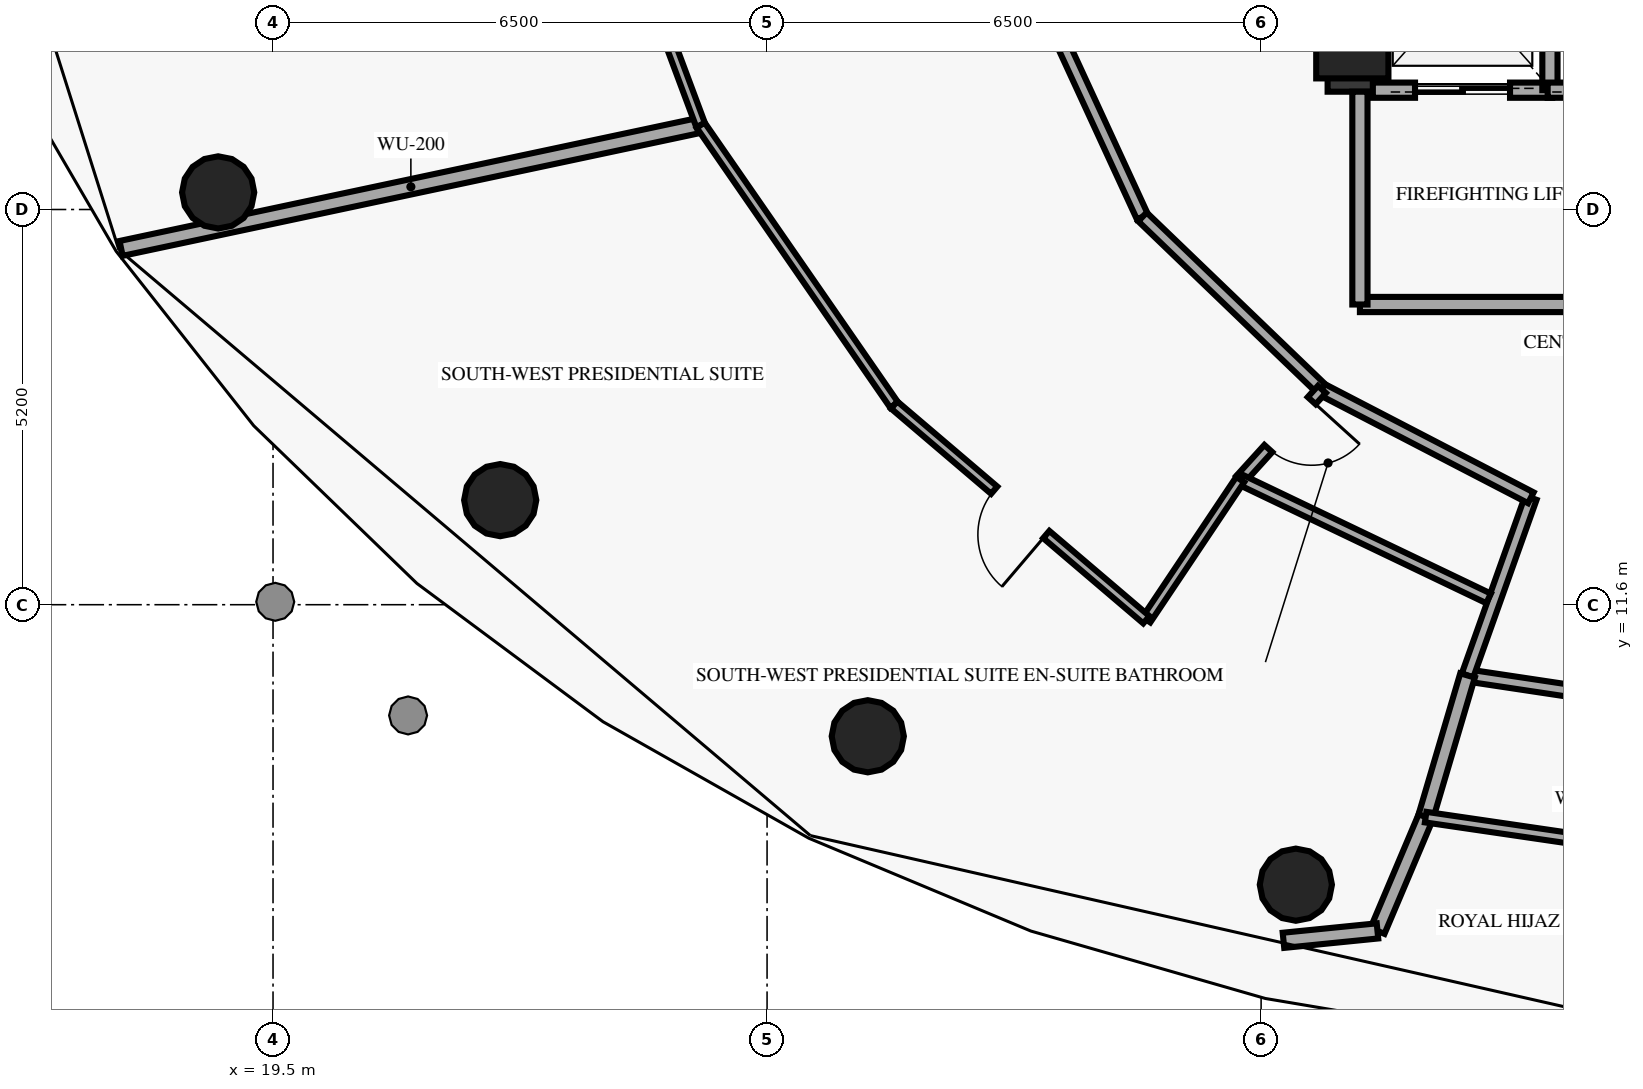
"""IFC4 building model, lengths in metres.
Left out: names, types, materials, properties, quantities, classifications, styles, units other than length and angle.
Written with IfcOpenShell. Run it as: python <this file> out.ifc"""

import sys

from ifc_helpers import new_model, si_unit, direction, frame, frame_2d, origin, origin_2d, place, context, subcontext, project, spatial, rectangle, circle, extrude, element, fill, save


model = new_model("IFC4")
c1 = context("Model", 3, precision=1e-05, world=origin(), true_north=direction((0.0, 1.0)))
c2 = subcontext(c1, "Body", "Model", "MODEL_VIEW")
j1 = project(units=[si_unit("LENGTHUNIT", "METRE"), si_unit("PLANEANGLEUNIT", "RADIAN")], contexts=[c1])
p1 = place(None, origin())
s1 = spatial("IfcSite", under=j1, at=p1, CompositionType="ELEMENT")
p2 = place(p1, origin())
s2 = spatial("IfcBuilding", under=s1, at=p2, CompositionType="ELEMENT")
p3 = place(p2, frame((0.0, 0.0, 192.25)))
s3 = spatial("IfcBuildingStorey", under=s2, at=p3, CompositionType="ELEMENT", Elevation=192.25)
p4 = place(p3, frame((33.7, 19.0, 0.0), z_axis=(0.0, 0.0, 1.0), x_axis=(1.0, 0.0, 0.0)))
e1 = element("IfcColumn", 1, at=p4, inside=s3, PredefinedType="PILASTER", context=c2, shape_type="SweptSolid", body=[
    extrude(rectangle(XDim=0.95, YDim=0.95, at=origin_2d()), origin(), (0.0, 0.0, 1.0), 3.35),
])
for number, where, z_axis, x_axis in (
    (2, (18.778, 17.025, 0.0), (0.0, 0.0, 1.0), (1.0, 0.0, 0.0)),
    (3, (22.489, 12.976, 0.0), (0.0, 0.0, 1.0), (1.0, 0.0, 0.0)),
    (4, (27.325, 9.869, 0.0), (0.0, 0.0, 1.0), (1.0, 0.0, 0.0)),
    (5, (32.957, 7.916, 0.0), (0.0, 0.0, 1.0), (1.0, 0.0, 0.0)),
):
    element("IfcColumn", number, at=place(p3, frame(where, z_axis=z_axis, x_axis=x_axis)), inside=s3, PredefinedType="COLUMN", context=c2, shape_type="SweptSolid", body=[
        extrude(circle(Radius=0.475, at=origin_2d()), origin(), (0.0, 0.0, 1.0), 3.35),
    ])
p5 = place(p3, frame((33.7, 18.35, 0.0), z_axis=(0.0, 0.0, 1.0), x_axis=(0.0, 1.0, 0.0)))
e6 = element("IfcWall", 6, at=p5, inside=s3, PredefinedType="SHEAR", context=c2, shape_type="SweptSolid", body=[
    extrude(rectangle(XDim=2.95, YDim=0.65, at=frame_2d((1.475, 0.0))), origin(), (0.0, 0.0, 1.0), 3.35),
])
p6 = place(p3, frame((33.97, 18.37, 0.0), z_axis=(0.0, 0.0, 1.0), x_axis=(1.0, 0.0, 0.0)))
e7 = element("IfcWall", 7, at=p6, inside=s3, PredefinedType="SOLIDWALL", context=c2, shape_type="SweptSolid", body=[
    extrude(rectangle(XDim=2.36, YDim=0.2, at=frame_2d((1.18, 0.0))), origin(), (0.0, 0.0, 1.0), 3.35),
])
p7 = place(p6, frame((0.555, 0.0, 0.0)))
e8 = element("IfcOpeningElement", 8, at=p7, cuts=e7, PredefinedType="OPENING", context=c2, shape_type="SweptSolid", body=[
    extrude(rectangle(XDim=1.25, YDim=2.2, at=frame_2d((0.625, 1.1))), frame((0.0, 0.11, 0.0), z_axis=(0.0, -1.0, 0.0), x_axis=(1.0, 0.0, 0.0)), (0.0, 0.0, 1.0), 0.22),
])
p8 = place(p3, frame((36.3, 18.37, 0.0), z_axis=(0.0, 0.0, 1.0), x_axis=(0.0, 1.0, 0.0)))
e9 = element("IfcWall", 9, at=p8, inside=s3, PredefinedType="SOLIDWALL", context=c2, shape_type="SweptSolid", body=[
    extrude(rectangle(XDim=2.71, YDim=0.2, at=frame_2d((1.355, 0.0))), origin(), (0.0, 0.0, 1.0), 3.35),
])
p9 = place(p3, frame((36.27, 18.37, 0.0), z_axis=(0.0, 0.0, 1.0), x_axis=(1.0, 0.0, 0.0)))
e10 = element("IfcWall", 10, at=p9, inside=s3, PredefinedType="SOLIDWALL", context=c2, shape_type="SweptSolid", body=[
    extrude(rectangle(XDim=2.36, YDim=0.2, at=frame_2d((1.18, 0.0))), origin(), (0.0, 0.0, 1.0), 3.35),
])
p10 = place(p9, frame((0.38, 0.0, 0.0)))
e11 = element("IfcOpeningElement", 11, at=p10, cuts=e10, PredefinedType="OPENING", context=c2, shape_type="SweptSolid", body=[
    extrude(rectangle(XDim=1.25, YDim=2.2, at=frame_2d((0.625, 1.1))), frame((0.0, 0.11, 0.0), z_axis=(0.0, -1.0, 0.0), x_axis=(1.0, 0.0, 0.0)), (0.0, 0.0, 1.0), 0.22),
])
p11 = place(p3, frame((33.8, 15.55, 0.0), z_axis=(0.0, 0.0, 1.0), x_axis=(1.0, 0.0, 0.0)))
e12 = element("IfcWall", 12, at=p11, inside=s3, PredefinedType="SOLIDWALL", context=c2, shape_type="SweptSolid", body=[
    extrude(rectangle(XDim=7.55, YDim=0.2, at=frame_2d((3.775, 0.0))), origin(), (0.0, 0.0, 1.0), 3.35),
])
p12 = place(p3, frame((33.8, 15.55, 0.0), z_axis=(0.0, 0.0, 1.0), x_axis=(0.0, 1.0, 0.0)))
e13 = element("IfcWall", 13, at=p12, inside=s3, PredefinedType="SOLIDWALL", context=c2, shape_type="SweptSolid", body=[
    extrude(rectangle(XDim=2.8, YDim=0.2, at=frame_2d((1.4, 0.0))), origin(), (0.0, 0.0, 1.0), 3.35),
])
p13 = place(p3, frame((35.216, 10.669, 0.0), z_axis=(0.0, 0.0, 1.0), x_axis=(0.988888097148, -0.148661801817, 0.0)))
e14 = element("IfcWall", 14, at=p13, inside=s3, PredefinedType="PARTITIONING", context=c2, shape_type="SweptSolid", body=[
    extrude(rectangle(XDim=3.826, YDim=0.16, at=frame_2d((1.913, 0.0))), origin(), (0.0, 0.0, 1.0), 3.35),
])
p14 = place(p3, frame((36.049, 13.007, 0.0), z_axis=(0.0, 0.0, 1.0), x_axis=(-0.335607268638, -0.942001996408, 0.0)))
e15 = element("IfcWall", 15, at=p14, inside=s3, PredefinedType="PARTITIONING", context=c2, shape_type="SweptSolid", body=[
    extrude(rectangle(XDim=2.482, YDim=0.16, at=frame_2d((1.241, 0.0))), origin(), (0.0, 0.0, 1.0), 3.35),
])
p15 = place(p3, frame((35.216, 10.669, 0.0), z_axis=(0.0, 0.0, 1.0), x_axis=(-0.283485285535, -0.958976586203, 0.0)))
e16 = element("IfcWall", 16, at=p15, inside=s3, PredefinedType="PARTITIONING", context=c2, shape_type="SweptSolid", body=[
    extrude(rectangle(XDim=1.944, YDim=0.2, at=frame_2d((0.972, 0.0))), origin(), (0.0, 0.0, 1.0), 3.35),
])
p16 = place(p3, frame((34.665, 8.805, 0.0), z_axis=(0.0, 0.0, 1.0), x_axis=(-0.39003681134, -0.920799264661, 0.0)))
e17 = element("IfcWall", 17, at=p16, inside=s3, PredefinedType="PARTITIONING", context=c2, shape_type="SweptSolid", body=[
    extrude(rectangle(XDim=1.625, YDim=0.2, at=frame_2d((0.813, 0.0))), origin(), (0.0, 0.0, 1.0), 3.35),
])
p17 = place(p3, frame((34.031, 7.308, 0.0), z_axis=(0.0, 0.0, 1.0), x_axis=(-0.995011882632, -0.09975647057, 0.0)))
e18 = element("IfcWall", 18, at=p17, inside=s3, PredefinedType="PARTITIONING", context=c2, shape_type="SweptSolid", body=[
    extrude(rectangle(XDim=1.243, YDim=0.2, at=frame_2d((0.622, 0.0))), origin(), (0.0, 0.0, 1.0), 3.35),
])
p18 = place(p3, frame((34.665, 8.805, 0.0), z_axis=(0.0, 0.0, 1.0), x_axis=(0.989440607964, -0.144938895095, 0.0)))
e19 = element("IfcWall", 19, at=p18, inside=s3, PredefinedType="PARTITIONING", context=c2, shape_type="SweptSolid", body=[
    extrude(rectangle(XDim=4.381, YDim=0.14, at=frame_2d((2.19, 0.0))), origin(), (0.0, 0.0, 1.0), 3.35),
])
p19 = place(p3, frame((27.988, 23.104, 0.0), z_axis=(0.0, 0.0, 1.0), x_axis=(0.418656179426, -0.908144814128, 0.0)))
e20 = element("IfcWall", 20, at=p19, inside=s3, PredefinedType="PARTITIONING", context=c2, shape_type="SweptSolid", body=[
    extrude(rectangle(XDim=7.049, YDim=0.16, at=frame_2d((3.524, 0.0))), origin(), (0.0, 0.0, 1.0), 3.35),
])
p20 = place(p3, frame((30.939, 16.703, 0.0), z_axis=(0.0, 0.0, 1.0), x_axis=(0.72090897908, -0.693029756851, 0.0)))
e21 = element("IfcWall", 21, at=p20, inside=s3, PredefinedType="PARTITIONING", context=c2, shape_type="SweptSolid", body=[
    extrude(rectangle(XDim=3.275, YDim=0.16, at=frame_2d((1.638, 0.0))), origin(), (0.0, 0.0, 1.0), 3.35),
])
p21 = place(p3, frame((33.3, 14.433, 0.0), z_axis=(0.0, 0.0, 1.0), x_axis=(0.887674575788, -0.460471331898, 0.0)))
e22 = element("IfcWall", 22, at=p21, inside=s3, PredefinedType="PARTITIONING", context=c2, shape_type="SweptSolid", body=[
    extrude(rectangle(XDim=3.097, YDim=0.16, at=frame_2d((1.548, 0.0))), origin(), (0.0, 0.0, 1.0), 3.35),
])
p22 = place(p3, frame((25.126, 17.91, 0.0), z_axis=(0.0, 0.0, 1.0), x_axis=(-0.978119354701, -0.208044533596, 0.0)))
e23 = element("IfcWall", 23, at=p22, inside=s3, PredefinedType="PARTITIONING", context=c2, shape_type="SweptSolid", body=[
    extrude(rectangle(XDim=7.796, YDim=0.2, at=frame_2d((3.898, 0.0))), origin(), (0.0, 0.0, 1.0), 3.35),
])
p23 = place(p3, frame((33.3, 14.433, 0.0), z_axis=(0.0, 0.0, 1.0), x_axis=(-0.671556062003, -0.740953747266, 0.0)))
e24 = element("IfcWall", 24, at=p23, inside=s3, PredefinedType="PARTITIONING", context=c2, shape_type="SweptSolid", body=[
    extrude(rectangle(XDim=1.601, YDim=0.14, at=frame_2d((0.8, 0.0))), origin(), (0.0, 0.0, 1.0), 3.35),
])
p24 = place(p23, frame((0.2, 0.0, 0.0)))
e25 = element("IfcOpeningElement", 25, at=p24, cuts=e24, PredefinedType="OPENING", context=c2, shape_type="SweptSolid", body=[
    extrude(rectangle(XDim=0.85, YDim=2.1, at=frame_2d((0.425, 1.05))), frame((0.0, 0.08, 0.0), z_axis=(0.0, -1.0, 0.0), x_axis=(1.0, 0.0, 0.0)), (0.0, 0.0, 1.0), 0.16),
])
p25 = place(p3, frame((32.225, 13.247, 0.0), z_axis=(0.0, 0.0, 1.0), x_axis=(0.902016722043, -0.431701092372, 0.0)))
e26 = element("IfcWall", 26, at=p25, inside=s3, PredefinedType="PARTITIONING", context=c2, shape_type="SweptSolid", body=[
    extrude(rectangle(XDim=3.623, YDim=0.14, at=frame_2d((1.812, 0.0))), origin(), (0.0, 0.0, 1.0), 3.35),
])
p26 = place(p3, frame((32.225, 13.247, 0.0), z_axis=(0.0, 0.0, 1.0), x_axis=(-0.556297850913, -0.830982972791, 0.0)))
e27 = element("IfcWall", 27, at=p26, inside=s3, PredefinedType="PARTITIONING", context=c2, shape_type="SweptSolid", body=[
    extrude(rectangle(XDim=2.22, YDim=0.125, at=frame_2d((1.11, 0.0))), origin(), (0.0, 0.0, 1.0), 3.35),
])
p27 = place(p3, frame((23.526, 22.198, 0.0), z_axis=(0.0, 0.0, 1.0), x_axis=(0.349603098964, -0.936897899024, 0.0)))
e28 = element("IfcWall", 28, at=p27, inside=s3, PredefinedType="PARTITIONING", context=c2, shape_type="SweptSolid", body=[
    extrude(rectangle(XDim=4.577, YDim=0.125, at=frame_2d((2.289, 0.0))), origin(), (0.0, 0.0, 1.0), 3.35),
])
p28 = place(p3, frame((25.126, 17.91, 0.0), z_axis=(0.0, 0.0, 1.0), x_axis=(0.568778830708, -0.822490511641, 0.0)))
e29 = element("IfcWall", 29, at=p28, inside=s3, PredefinedType="PARTITIONING", context=c2, shape_type="SweptSolid", body=[
    extrude(rectangle(XDim=4.477, YDim=0.125, at=frame_2d((2.238, 0.0))), origin(), (0.0, 0.0, 1.0), 3.35),
])
p29 = place(p3, frame((27.672, 14.228, 0.0), z_axis=(0.0, 0.0, 1.0), x_axis=(0.76128931679, -0.648412350393, 0.0)))
e30 = element("IfcWall", 30, at=p29, inside=s3, PredefinedType="PARTITIONING", context=c2, shape_type="SweptSolid", body=[
    extrude(rectangle(XDim=4.358, YDim=0.125, at=frame_2d((2.179, 0.0))), origin(), (0.0, 0.0, 1.0), 3.35),
])
p30 = place(p29, frame((1.729, 0.0, 0.0)))
e31 = element("IfcOpeningElement", 31, at=p30, cuts=e30, PredefinedType="OPENING", context=c2, shape_type="SweptSolid", body=[
    extrude(rectangle(XDim=0.9, YDim=2.1, at=frame_2d((0.45, 1.05))), frame((0.0, 0.073, 0.0), z_axis=(0.0, -1.0, 0.0), x_axis=(1.0, 0.0, 0.0)), (0.0, 0.0, 1.0), 0.145),
])
p31 = place(p7, origin())
e32 = element("IfcDoor", 32, at=p31, inside=s3, OperationType="DOUBLE_DOOR_SLIDING", PredefinedType="DOOR", context=c2, shape_type="SweptSolid", body=[
    extrude(rectangle(XDim=1.25, YDim=2.2, at=frame_2d((0.625, 1.1))), frame((0.0, 0.025, 0.0), z_axis=(0.0, -1.0, 0.0), x_axis=(1.0, 0.0, 0.0)), (0.0, 0.0, 1.0), 0.05),
])
fill(e8, e32)
p32 = place(p24, origin())
e33 = element("IfcDoor", 33, at=p32, inside=s3, OperationType="SINGLE_SWING_LEFT", PredefinedType="DOOR", context=c2, shape_type="SweptSolid", body=[
    extrude(rectangle(XDim=0.85, YDim=2.1, at=frame_2d((0.425, 1.05))), frame((0.0, 0.025, 0.0), z_axis=(0.0, -1.0, 0.0), x_axis=(1.0, 0.0, 0.0)), (0.0, 0.0, 1.0), 0.05),
])
fill(e25, e33)
p33 = place(p30, origin())
e34 = element("IfcDoor", 34, at=p33, inside=s3, OperationType="SINGLE_SWING_RIGHT", PredefinedType="DOOR", context=c2, shape_type="SweptSolid", body=[
    extrude(rectangle(XDim=0.9, YDim=2.1, at=frame_2d((0.45, 1.05))), frame((0.0, 0.025, 0.0), z_axis=(0.0, -1.0, 0.0), x_axis=(1.0, 0.0, 0.0)), (0.0, 0.0, 1.0), 0.05),
])
fill(e31, e34)
save(model, sys.argv[1])
